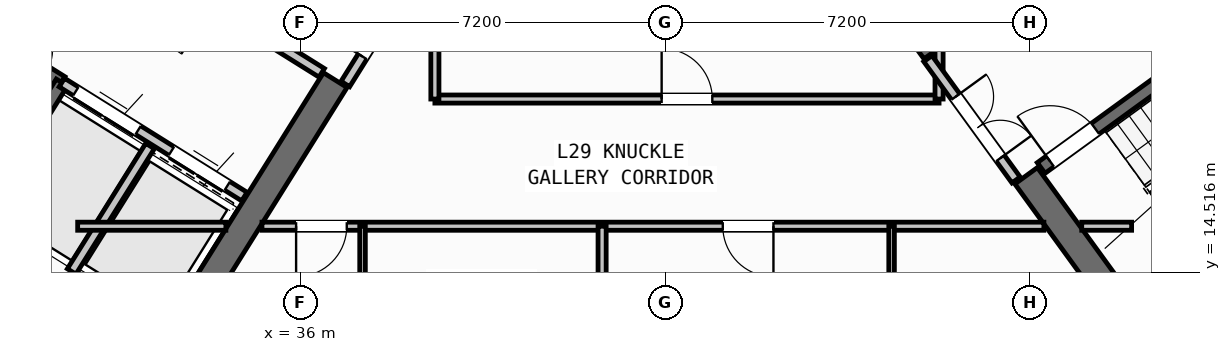
"""IFC4 building model, lengths in metres.
Left out: names, types, materials, properties, quantities, classifications, styles, units other than length and angle.
Written with IfcOpenShell. Run it as: python <this file> out.ifc"""

import sys

from ifc_helpers import new_model, si_unit, direction, frame, frame_2d, origin, place, context, subcontext, project, spatial, rectangle, extrude, source, transform, mapped, element, fill, save


model = new_model("IFC4")
c1 = context("Model", 3, precision=1e-05, world=origin(), true_north=direction((0.0, 1.0)))
c2 = subcontext(c1, "Body", "Model", "MODEL_VIEW")
j1 = project(units=[si_unit("LENGTHUNIT", "METRE"), si_unit("PLANEANGLEUNIT", "RADIAN")], contexts=[c1])
p1 = place(None, origin())
s1 = spatial("IfcSite", under=j1, at=p1, CompositionType="ELEMENT")
p2 = place(p1, origin())
s2 = spatial("IfcBuilding", under=s1, at=p2, CompositionType="ELEMENT")
p3 = place(p2, frame((0.0, 0.0, 116.1)))
s3 = spatial("IfcBuildingStorey", under=s2, at=p3, CompositionType="ELEMENT", Elevation=116.1)
p4 = place(p3, frame((33.366, 12.477, 0.0), z_axis=(0.0, 0.0, 1.0), x_axis=(-0.848047359947, 0.529920442413, 0.0)))
e1 = element("IfcWall", 1, at=p4, inside=s3, PredefinedType="SHEAR", context=c2, shape_type="SweptSolid", body=[
    extrude(rectangle(XDim=13.14, YDim=0.55, at=frame_2d((6.57, 0.0))), origin(), (0.0, 0.0, 1.0), 3.35),
])
p5 = place(p3, frame((36.683, 18.304, 0.0), z_axis=(0.0, 0.0, 1.0), x_axis=(-0.529896466841, -0.848062341122, 0.0)))
e2 = element("IfcWall", 2, at=p5, inside=s3, PredefinedType="SHEAR", context=c2, shape_type="SweptSolid", body=[
    extrude(rectangle(XDim=6.425, YDim=0.55, at=frame_2d((3.212, 0.0))), origin(), (0.0, 0.0, 1.0), 3.35),
])
p6 = place(p3, frame((52.359, 13.14, 0.0), z_axis=(0.0, 0.0, 1.0), x_axis=(0.809014896919, 0.587788139183, 0.0)))
e3 = element("IfcWall", 3, at=p6, inside=s3, PredefinedType="SHEAR", context=c2, shape_type="SweptSolid", body=[
    extrude(rectangle(XDim=12.34, YDim=0.55, at=frame_2d((6.17, 0.0))), origin(), (0.0, 0.0, 1.0), 3.35),
])
p7 = place(p3, frame((52.42, 13.524, 0.0), z_axis=(0.0, 0.0, 1.0), x_axis=(-0.587802113096, 0.809004744015, 0.0)))
e4 = element("IfcWall", 4, at=p7, inside=s3, PredefinedType="SHEAR", context=c2, shape_type="SweptSolid", body=[
    extrude(rectangle(XDim=3.575, YDim=0.55, at=frame_2d((1.788, 0.0))), origin(), (0.0, 0.0, 1.0), 3.35),
])
p8 = place(p3, frame((48.526, 18.884, 0.0), z_axis=(0.0, 0.0, 1.0), x_axis=(-0.587764933797, 0.809031756236, 0.0)))
e5 = element("IfcWall", 5, at=p8, inside=s3, PredefinedType="SHEAR", context=c2, shape_type="SweptSolid", body=[
    extrude(rectangle(XDim=6.425, YDim=0.55, at=frame_2d((3.212, 0.0))), origin(), (0.0, 0.0, 1.0), 3.35),
])
p9 = place(p3, frame((31.76, 12.183, 0.0), z_axis=(0.0, 0.0, 1.0), x_axis=(-0.848047074256, 0.529920899612, 0.0)))
e6 = element("IfcWall", 6, at=p9, inside=s3, PredefinedType="STANDARD", context=c2, shape_type="SweptSolid", body=[
    extrude(rectangle(XDim=30.652, YDim=0.32, at=frame_2d((15.326, 0.0))), origin(), (0.0, 0.0, 1.0), 3.35),
])
p10 = place(p9, frame((15.153, 0.0, 0.0)))
e7 = element("IfcOpeningElement", 7, at=p10, cuts=e6, PredefinedType="OPENING", context=c2, shape_type="SweptSolid", body=[
    extrude(rectangle(XDim=1.2, YDim=2.15, at=frame_2d((0.6, 1.075))), frame((0.0, 0.17, 0.0), z_axis=(0.0, -1.0, 0.0), x_axis=(1.0, 0.0, 0.0)), (0.0, 0.0, 1.0), 0.34),
])
p11 = place(p9, frame((2.002, 0.0, 0.8)))
e8 = element("IfcOpeningElement", 8, at=p11, cuts=e6, PredefinedType="OPENING", context=c2, shape_type="SweptSolid", body=[
    extrude(rectangle(XDim=2.1, YDim=1.55, at=frame_2d((1.05, 0.775))), frame((0.0, 0.17, 0.0), z_axis=(0.0, -1.0, 0.0), x_axis=(1.0, 0.0, 0.0)), (0.0, 0.0, 1.0), 0.34),
])
p12 = place(p9, frame((7.206, 0.0, 0.8)))
e9 = element("IfcOpeningElement", 9, at=p12, cuts=e6, PredefinedType="OPENING", context=c2, shape_type="SweptSolid", body=[
    extrude(rectangle(XDim=2.1, YDim=1.55, at=frame_2d((1.05, 0.775))), frame((0.0, 0.17, 0.0), z_axis=(0.0, -1.0, 0.0), x_axis=(1.0, 0.0, 0.0)), (0.0, 0.0, 1.0), 0.34),
])
p13 = place(p9, frame((12.648, 0.0, 1.0)))
e10 = element("IfcOpeningElement", 10, at=p13, cuts=e6, PredefinedType="OPENING", context=c2, shape_type="SweptSolid", body=[
    extrude(rectangle(XDim=0.9, YDim=1.25, at=frame_2d((0.45, 0.625))), frame((0.0, 0.17, 0.0), z_axis=(0.0, -1.0, 0.0), x_axis=(1.0, 0.0, 0.0)), (0.0, 0.0, 1.0), 0.34),
])
p14 = place(p9, frame((19.458, 0.0, 0.95)))
e11 = element("IfcOpeningElement", 11, at=p14, cuts=e6, PredefinedType="OPENING", context=c2, shape_type="SweptSolid", body=[
    extrude(rectangle(XDim=1.2, YDim=1.4, at=frame_2d((0.6, 0.7))), frame((0.0, 0.17, 0.0), z_axis=(0.0, -1.0, 0.0), x_axis=(1.0, 0.0, 0.0)), (0.0, 0.0, 1.0), 0.34),
])
p15 = place(p9, frame((21.858, 0.0, 0.95)))
e12 = element("IfcOpeningElement", 12, at=p15, cuts=e6, PredefinedType="OPENING", context=c2, shape_type="SweptSolid", body=[
    extrude(rectangle(XDim=1.2, YDim=1.4, at=frame_2d((0.6, 0.7))), frame((0.0, 0.17, 0.0), z_axis=(0.0, -1.0, 0.0), x_axis=(1.0, 0.0, 0.0)), (0.0, 0.0, 1.0), 0.34),
])
p16 = place(p9, frame((27.266, 0.0, 0.8)))
e13 = element("IfcOpeningElement", 13, at=p16, cuts=e6, PredefinedType="OPENING", context=c2, shape_type="SweptSolid", body=[
    extrude(rectangle(XDim=2.1, YDim=1.55, at=frame_2d((1.05, 0.775))), frame((0.0, 0.17, 0.0), z_axis=(0.0, -1.0, 0.0), x_axis=(1.0, 0.0, 0.0)), (0.0, 0.0, 1.0), 0.34),
])
p17 = place(p3, frame((31.28, 18.261, 0.0), z_axis=(0.0, 0.0, 1.0), x_axis=(-0.848051618787, 0.529913626805, 0.0)))
e14 = element("IfcWall", 14, at=p17, inside=s3, PredefinedType="SHEAR", context=c2, shape_type="SweptSolid", body=[
    extrude(rectangle(XDim=7.46, YDim=0.26, at=frame_2d((3.73, 0.0))), origin(), (0.0, 0.0, 1.0), 3.35),
])
p18 = place(p17, frame((0.36, 0.0, 0.0)))
e15 = element("IfcOpeningElement", 15, at=p18, cuts=e14, PredefinedType="OPENING", context=c2, shape_type="SweptSolid", body=[
    extrude(rectangle(XDim=0.86, YDim=2.05, at=frame_2d((0.43, 1.025))), frame((0.0, 0.14, 0.0), z_axis=(0.0, -1.0, 0.0), x_axis=(1.0, 0.0, 0.0)), (0.0, 0.0, 1.0), 0.28),
])
p19 = place(p3, frame((31.288, 18.256, 0.0), z_axis=(0.0, 0.0, 1.0), x_axis=(-0.529943379326, -0.848033026897, 0.0)))
e16 = element("IfcWall", 16, at=p19, inside=s3, PredefinedType="SHEAR", context=c2, shape_type="SweptSolid", body=[
    extrude(rectangle(XDim=3.16, YDim=0.26, at=frame_2d((1.58, 0.0))), origin(), (0.0, 0.0, 1.0), 3.35),
])
p20 = place(p3, frame((34.891, 16.005, 0.0), z_axis=(0.0, 0.0, 1.0), x_axis=(-0.848062873452, 0.529895614884, 0.0)))
e17 = element("IfcWall", 17, at=p20, inside=s3, PredefinedType="STANDARD", context=c2, shape_type="SweptSolid", body=[
    extrude(rectangle(XDim=4.248, YDim=0.2, at=frame_2d((2.124, 0.0))), origin(), (0.0, 0.0, 1.0), 3.34),
])
p21 = place(p20, frame((0.398, 0.0, 0.0)))
e18 = element("IfcOpeningElement", 18, at=p21, cuts=e17, PredefinedType="OPENING", context=c2, shape_type="SweptSolid", body=[
    extrude(rectangle(XDim=1.3, YDim=2.2, at=frame_2d((0.65, 1.1))), frame((0.0, 0.11, 0.0), z_axis=(0.0, -1.0, 0.0), x_axis=(1.0, 0.0, 0.0)), (0.0, 0.0, 1.0), 0.22),
])
p22 = place(p20, frame((2.473, 0.0, 0.0)))
e19 = element("IfcOpeningElement", 19, at=p22, cuts=e17, PredefinedType="OPENING", context=c2, shape_type="SweptSolid", body=[
    extrude(rectangle(XDim=1.45, YDim=2.25, at=frame_2d((0.725, 1.125))), frame((0.0, 0.11, 0.0), z_axis=(0.0, -1.0, 0.0), x_axis=(1.0, 0.0, 0.0)), (0.0, 0.0, 1.0), 0.22),
])
p23 = place(p3, frame((36.417, 18.447, 0.0), z_axis=(0.0, 0.0, 1.0), x_axis=(-0.848064879198, 0.529892404805, 0.0)))
e20 = element("IfcWall", 20, at=p23, inside=s3, PredefinedType="STANDARD", context=c2, shape_type="SweptSolid", body=[
    extrude(rectangle(XDim=5.768, YDim=0.2, at=frame_2d((2.884, 0.0))), origin(), (0.0, 0.0, 1.0), 3.34),
])
p24 = place(p23, frame((2.548, 0.0, 0.0)))
e21 = element("IfcOpeningElement", 21, at=p24, cuts=e20, PredefinedType="OPENING", context=c2, shape_type="SweptSolid", body=[
    extrude(rectangle(XDim=1.15, YDim=2.1, at=frame_2d((0.575, 1.05))), frame((0.0, 0.11, 0.0), z_axis=(0.0, -1.0, 0.0), x_axis=(1.0, 0.0, 0.0)), (0.0, 0.0, 1.0), 0.22),
])
p25 = place(p3, frame((33.029, 17.003, 0.0), z_axis=(0.0, 0.0, 1.0), x_axis=(-0.529916267533, -0.848049968695, 0.0)))
e22 = element("IfcWall", 22, at=p25, inside=s3, PredefinedType="STANDARD", context=c2, shape_type="SweptSolid", body=[
    extrude(rectangle(XDim=2.92, YDim=0.2, at=frame_2d((1.46, 0.0))), origin(), (0.0, 0.0, 1.0), 3.34),
])
p26 = place(p3, frame((52.472, 14.013, 0.0), z_axis=(0.0, 0.0, 1.0), x_axis=(0.809028366311, 0.587769599847, 0.0)))
e23 = element("IfcWall", 23, at=p26, inside=s3, PredefinedType="SHEAR", context=c2, shape_type="SweptSolid", body=[
    extrude(rectangle(XDim=7.33, YDim=0.26, at=frame_2d((3.665, 0.0))), origin(), (0.0, 0.0, 1.0), 3.35),
])
p27 = place(p3, frame((50.615, 16.57, 0.0), z_axis=(0.0, 0.0, 1.0), x_axis=(0.809028366311, 0.587769599847, 0.0)))
e24 = element("IfcWall", 24, at=p27, inside=s3, PredefinedType="SHEAR", context=c2, shape_type="SweptSolid", body=[
    extrude(rectangle(XDim=7.33, YDim=0.26, at=frame_2d((3.665, 0.0))), origin(), (0.0, 0.0, 1.0), 3.35),
])
p28 = place(p27, frame((0.22, 0.0, 0.0)))
e25 = element("IfcOpeningElement", 25, at=p28, cuts=e24, PredefinedType="OPENING", context=c2, shape_type="SweptSolid", body=[
    extrude(rectangle(XDim=1.1, YDim=2.1, at=frame_2d((0.55, 1.05))), frame((0.0, 0.14, 0.0), z_axis=(0.0, -1.0, 0.0), x_axis=(1.0, 0.0, 0.0)), (0.0, 0.0, 1.0), 0.28),
])
p29 = place(p3, frame((38.451, 20.737, 0.0), z_axis=(0.0, 0.0, 1.0), x_axis=(-0.529924799939, -0.848044637038, 0.0)))
e26 = element("IfcWall", 26, at=p29, inside=s3, PredefinedType="STANDARD", context=c2, shape_type="SweptSolid", body=[
    extrude(rectangle(XDim=2.96, YDim=0.2, at=frame_2d((1.48, 0.0))), origin(), (0.0, 0.0, 1.0), 3.34),
])
p30 = place(p29, frame((1.46, 0.0, 0.0)))
e27 = element("IfcOpeningElement", 27, at=p30, cuts=e26, PredefinedType="OPENING", context=c2, shape_type="SweptSolid", body=[
    extrude(rectangle(XDim=0.86, YDim=2.05, at=frame_2d((0.43, 1.025))), frame((0.0, 0.11, 0.0), z_axis=(0.0, -1.0, 0.0), x_axis=(1.0, 0.0, 0.0)), (0.0, 0.0, 1.0), 0.22),
])
p31 = place(p3, frame((31.6, 15.42, 0.0), z_axis=(0.0, 0.0, 1.0), x_axis=(1.0, 0.0, 0.0)))
e28 = element("IfcWall", 28, at=p31, inside=s3, PredefinedType="PARTITIONING", context=c2, shape_type="SweptSolid", body=[
    extrude(rectangle(XDim=2.925, YDim=0.16, at=frame_2d((1.462, 0.0))), origin(), (0.0, 0.0, 1.0), 3.34),
])
p32 = place(p3, frame((35.237, 15.42, 0.0), z_axis=(0.0, 0.0, 1.0), x_axis=(1.0, 0.0, 0.0)))
e29 = element("IfcWall", 29, at=p32, inside=s3, PredefinedType="PARTITIONING", context=c2, shape_type="SweptSolid", body=[
    extrude(rectangle(XDim=15.432, YDim=0.16, at=frame_2d((7.716, 0.0))), origin(), (0.0, 0.0, 1.0), 3.34),
])
p33 = place(p32, frame((0.674, 0.0, 0.0)))
e30 = element("IfcOpeningElement", 30, at=p33, cuts=e29, PredefinedType="OPENING", context=c2, shape_type="SweptSolid", body=[
    extrude(rectangle(XDim=1.0, YDim=2.1, at=frame_2d((0.5, 1.05))), frame((0.0, 0.09, 0.0), z_axis=(0.0, -1.0, 0.0), x_axis=(1.0, 0.0, 0.0)), (0.0, 0.0, 1.0), 0.18),
])
p34 = place(p32, frame((9.094, 0.0, 0.0)))
e31 = element("IfcOpeningElement", 31, at=p34, cuts=e29, PredefinedType="OPENING", context=c2, shape_type="SweptSolid", body=[
    extrude(rectangle(XDim=1.0, YDim=2.1, at=frame_2d((0.5, 1.05))), frame((0.0, 0.09, 0.0), z_axis=(0.0, -1.0, 0.0), x_axis=(1.0, 0.0, 0.0)), (0.0, 0.0, 1.0), 0.18),
])
p35 = place(p3, frame((51.416, 15.42, 0.0), z_axis=(0.0, 0.0, 1.0), x_axis=(1.0, 0.0, 0.0)))
e32 = element("IfcWall", 32, at=p35, inside=s3, PredefinedType="PARTITIONING", context=c2, shape_type="SweptSolid", body=[
    extrude(rectangle(XDim=0.984, YDim=0.16, at=frame_2d((0.492, 0.0))), origin(), (0.0, 0.0, 1.0), 3.34),
])
p36 = place(p3, frame((38.65, 17.93, 0.0), z_axis=(0.0, 0.0, 1.0), x_axis=(1.0, 0.0, 0.0)))
e33 = element("IfcWall", 33, at=p36, inside=s3, PredefinedType="PARTITIONING", context=c2, shape_type="SweptSolid", body=[
    extrude(rectangle(XDim=9.95, YDim=0.16, at=frame_2d((4.975, 0.0))), origin(), (0.0, 0.0, 1.0), 3.34),
])
p37 = place(p36, frame((4.475, 0.0, 0.0)))
e34 = element("IfcOpeningElement", 34, at=p37, cuts=e33, PredefinedType="OPENING", context=c2, shape_type="SweptSolid", body=[
    extrude(rectangle(XDim=1.0, YDim=2.1, at=frame_2d((0.5, 1.05))), frame((0.0, 0.09, 0.0), z_axis=(0.0, -1.0, 0.0), x_axis=(1.0, 0.0, 0.0)), (0.0, 0.0, 1.0), 0.18),
])
p38 = place(p3, frame((38.65, 17.93, 0.0), z_axis=(0.0, 0.0, 1.0), x_axis=(0.0, 1.0, 0.0)))
e35 = element("IfcWall", 35, at=p38, inside=s3, PredefinedType="PARTITIONING", context=c2, shape_type="SweptSolid", body=[
    extrude(rectangle(XDim=2.951, YDim=0.16, at=frame_2d((1.476, 0.0))), origin(), (0.0, 0.0, 1.0), 3.34),
])
p39 = place(p3, frame((48.6, 17.93, 0.0), z_axis=(0.0, 0.0, 1.0), x_axis=(0.0, 1.0, 0.0)))
e36 = element("IfcWall", 36, at=p39, inside=s3, PredefinedType="PARTITIONING", context=c2, shape_type="SweptSolid", body=[
    extrude(rectangle(XDim=0.993, YDim=0.16, at=frame_2d((0.496, 0.0))), origin(), (0.0, 0.0, 1.0), 3.34),
])
p40 = place(p3, frame((50.119, 16.333, 0.0), z_axis=(0.0, 0.0, 1.0), x_axis=(-0.587749856981, 0.809042709391, 0.0)))
e37 = element("IfcWall", 37, at=p40, inside=s3, PredefinedType="STANDARD", context=c2, shape_type="SweptSolid", body=[
    extrude(rectangle(XDim=2.96, YDim=0.2, at=frame_2d((1.48, 0.0))), origin(), (0.0, 0.0, 1.0), 3.34),
])
p41 = place(p40, frame((0.53, 0.0, 0.0)))
e38 = element("IfcOpeningElement", 38, at=p41, cuts=e37, PredefinedType="OPENING", context=c2, shape_type="SweptSolid", body=[
    extrude(rectangle(XDim=1.5, YDim=2.15, at=frame_2d((0.75, 1.075))), frame((0.0, 0.11, 0.0), z_axis=(0.0, -1.0, 0.0), x_axis=(1.0, 0.0, 0.0)), (0.0, 0.0, 1.0), 0.22),
])
p42 = place(p3, frame((41.95, 1.96, 0.0), z_axis=(0.0, 0.0, 1.0), x_axis=(0.0, 1.0, 0.0)))
e39 = element("IfcWall", 39, at=p42, inside=s3, PredefinedType="PARTITIONING", context=c2, shape_type="SweptSolid", body=[
    extrude(rectangle(XDim=13.46, YDim=0.16, at=frame_2d((6.73, 0.0))), origin(), (0.0, 0.0, 1.0), 3.34),
])
p43 = place(p3, frame((37.222, 1.96, 0.0), z_axis=(0.0, 0.0, 1.0), x_axis=(0.0, 1.0, 0.0)))
e40 = element("IfcWall", 40, at=p43, inside=s3, PredefinedType="PARTITIONING", context=c2, shape_type="SweptSolid", body=[
    extrude(rectangle(XDim=13.46, YDim=0.11, at=frame_2d((6.73, 0.0))), origin(), (0.0, 0.0, 1.0), 3.34),
])
p44 = place(p43, frame((5.2, 0.0, 0.0)))
e41 = element("IfcOpeningElement", 41, at=p44, cuts=e40, PredefinedType="OPENING", context=c2, shape_type="SweptSolid", body=[
    extrude(rectangle(XDim=0.92, YDim=2.08, at=frame_2d((0.46, 1.04))), frame((0.0, 0.065, 0.0), z_axis=(0.0, -1.0, 0.0), x_axis=(1.0, 0.0, 0.0)), (0.0, 0.0, 1.0), 0.13),
])
p45 = place(p43, frame((10.45, 0.0, 0.0)))
e42 = element("IfcOpeningElement", 42, at=p45, cuts=e40, PredefinedType="OPENING", context=c2, shape_type="SweptSolid", body=[
    extrude(rectangle(XDim=0.88, YDim=2.08, at=frame_2d((0.44, 1.04))), frame((0.0, 0.065, 0.0), z_axis=(0.0, -1.0, 0.0), x_axis=(1.0, 0.0, 0.0)), (0.0, 0.0, 1.0), 0.13),
])
p46 = place(p3, frame((47.663, 1.96, 0.0), z_axis=(0.0, 0.0, 1.0), x_axis=(0.0, 1.0, 0.0)))
e43 = element("IfcWall", 43, at=p46, inside=s3, PredefinedType="PARTITIONING", context=c2, shape_type="SweptSolid", body=[
    extrude(rectangle(XDim=13.46, YDim=0.11, at=frame_2d((6.73, 0.0))), origin(), (0.0, 0.0, 1.0), 3.34),
])
p47 = place(p46, frame((6.3, 0.0, 0.0)))
e44 = element("IfcOpeningElement", 44, at=p47, cuts=e43, PredefinedType="OPENING", context=c2, shape_type="SweptSolid", body=[
    extrude(rectangle(XDim=0.92, YDim=2.08, at=frame_2d((0.46, 1.04))), frame((0.0, 0.065, 0.0), z_axis=(0.0, -1.0, 0.0), x_axis=(1.0, 0.0, 0.0)), (0.0, 0.0, 1.0), 0.13),
])
p48 = place(p46, frame((11.1, 0.0, 0.0)))
e45 = element("IfcOpeningElement", 45, at=p48, cuts=e43, PredefinedType="OPENING", context=c2, shape_type="SweptSolid", body=[
    extrude(rectangle(XDim=0.88, YDim=2.08, at=frame_2d((0.44, 1.04))), frame((0.0, 0.065, 0.0), z_axis=(0.0, -1.0, 0.0), x_axis=(1.0, 0.0, 0.0)), (0.0, 0.0, 1.0), 0.13),
])
m1 = source(origin(), c2, "Body", "SweptSolid", [
    extrude(rectangle(XDim=1.3, YDim=2.2, at=frame_2d((0.65, 1.1))), frame((0.0, 0.025, 0.0), z_axis=(0.0, -1.0, 0.0), x_axis=(1.0, 0.0, 0.0)), (0.0, 0.0, 1.0), 0.05),
])
p49 = place(p21, origin())
e46 = element("IfcDoor", 46, at=p49, inside=s3, OperationType="DOUBLE_DOOR_SLIDING", PredefinedType="DOOR", context=c2, shape_type="MappedRepresentation", body=[
    mapped(m1, transform((0.0, 0.0, 0.0), scale=1.0)),
])
fill(e18, e46)
m2 = source(origin(), c2, "Body", "SweptSolid", [
    extrude(rectangle(XDim=1.45, YDim=2.25, at=frame_2d((0.725, 1.125))), frame((0.0, 0.025, 0.0), z_axis=(0.0, -1.0, 0.0), x_axis=(1.0, 0.0, 0.0)), (0.0, 0.0, 1.0), 0.05),
])
p50 = place(p22, origin())
e47 = element("IfcDoor", 47, at=p50, inside=s3, OperationType="DOUBLE_DOOR_SLIDING", PredefinedType="DOOR", context=c2, shape_type="MappedRepresentation", body=[
    mapped(m2, transform((0.0, 0.0, 0.0), scale=1.0)),
])
fill(e19, e47)
m3 = source(origin(), c2, "Body", "SweptSolid", [
    extrude(rectangle(XDim=1.1, YDim=2.1, at=frame_2d((0.55, 1.05))), frame((0.0, 0.025, 0.0), z_axis=(0.0, -1.0, 0.0), x_axis=(1.0, 0.0, 0.0)), (0.0, 0.0, 1.0), 0.05),
])
p51 = place(p28, origin())
e48 = element("IfcDoor", 48, at=p51, inside=s3, OperationType="SINGLE_SWING_LEFT", PredefinedType="DOOR", context=c2, shape_type="MappedRepresentation", body=[
    mapped(m3, transform((0.0, 0.0, 0.0), scale=1.0)),
])
fill(e25, e48)
m4 = source(origin(), c2, "Body", "SweptSolid", [
    extrude(rectangle(XDim=1.0, YDim=2.1, at=frame_2d((0.5, 1.05))), frame((0.0, 0.025, 0.0), z_axis=(0.0, -1.0, 0.0), x_axis=(1.0, 0.0, 0.0)), (0.0, 0.0, 1.0), 0.05),
])
p52 = place(p37, origin())
e49 = element("IfcDoor", 49, at=p52, inside=s3, OperationType="SINGLE_SWING_LEFT", PredefinedType="DOOR", context=c2, shape_type="MappedRepresentation", body=[
    mapped(m4, transform((0.0, 0.0, 0.0), scale=1.0)),
])
fill(e34, e49)
m5 = source(origin(), c2, "Body", "SweptSolid", [
    extrude(rectangle(XDim=0.86, YDim=2.05, at=frame_2d((0.43, 1.025))), frame((0.0, 0.025, 0.0), z_axis=(0.0, -1.0, 0.0), x_axis=(1.0, 0.0, 0.0)), (0.0, 0.0, 1.0), 0.05),
])
p53 = place(p30, frame((0.86, 0.0, 0.0), z_axis=(0.0, 0.0, 1.0), x_axis=(-1.0, 0.0, 0.0)))
e50 = element("IfcDoor", 50, at=p53, inside=s3, OperationType="SINGLE_SWING_LEFT", PredefinedType="DOOR", context=c2, shape_type="MappedRepresentation", body=[
    mapped(m5, transform((0.0, 0.0, 0.0), scale=1.0)),
])
fill(e27, e50)
m6 = source(origin(), c2, "Body", "SweptSolid", [
    extrude(rectangle(XDim=1.5, YDim=2.15, at=frame_2d((0.75, 1.075))), frame((0.0, 0.025, 0.0), z_axis=(0.0, -1.0, 0.0), x_axis=(1.0, 0.0, 0.0)), (0.0, 0.0, 1.0), 0.05),
])
p54 = place(p41, frame((1.5, 0.0, 0.0), z_axis=(0.0, 0.0, 1.0), x_axis=(-1.0, 0.0, 0.0)))
e51 = element("IfcDoor", 51, at=p54, inside=s3, OperationType="DOUBLE_DOOR_SINGLE_SWING", PredefinedType="DOOR", context=c2, shape_type="MappedRepresentation", body=[
    mapped(m6, transform((0.0, 0.0, 0.0), scale=1.0)),
])
fill(e38, e51)
p55 = place(p33, frame((1.0, 0.0, 0.0), z_axis=(0.0, 0.0, 1.0), x_axis=(-1.0, 0.0, 0.0)))
e52 = element("IfcDoor", 52, at=p55, inside=s3, OperationType="SINGLE_SWING_RIGHT", PredefinedType="DOOR", context=c2, shape_type="MappedRepresentation", body=[
    mapped(m4, transform((0.0, 0.0, 0.0), scale=1.0)),
])
fill(e30, e52)
p56 = place(p34, frame((1.0, 0.0, 0.0), z_axis=(0.0, 0.0, 1.0), x_axis=(-1.0, 0.0, 0.0)))
e53 = element("IfcDoor", 53, at=p56, inside=s3, OperationType="SINGLE_SWING_LEFT", PredefinedType="DOOR", context=c2, shape_type="MappedRepresentation", body=[
    mapped(m4, transform((0.0, 0.0, 0.0), scale=1.0)),
])
fill(e31, e53)
save(model, sys.argv[1])
